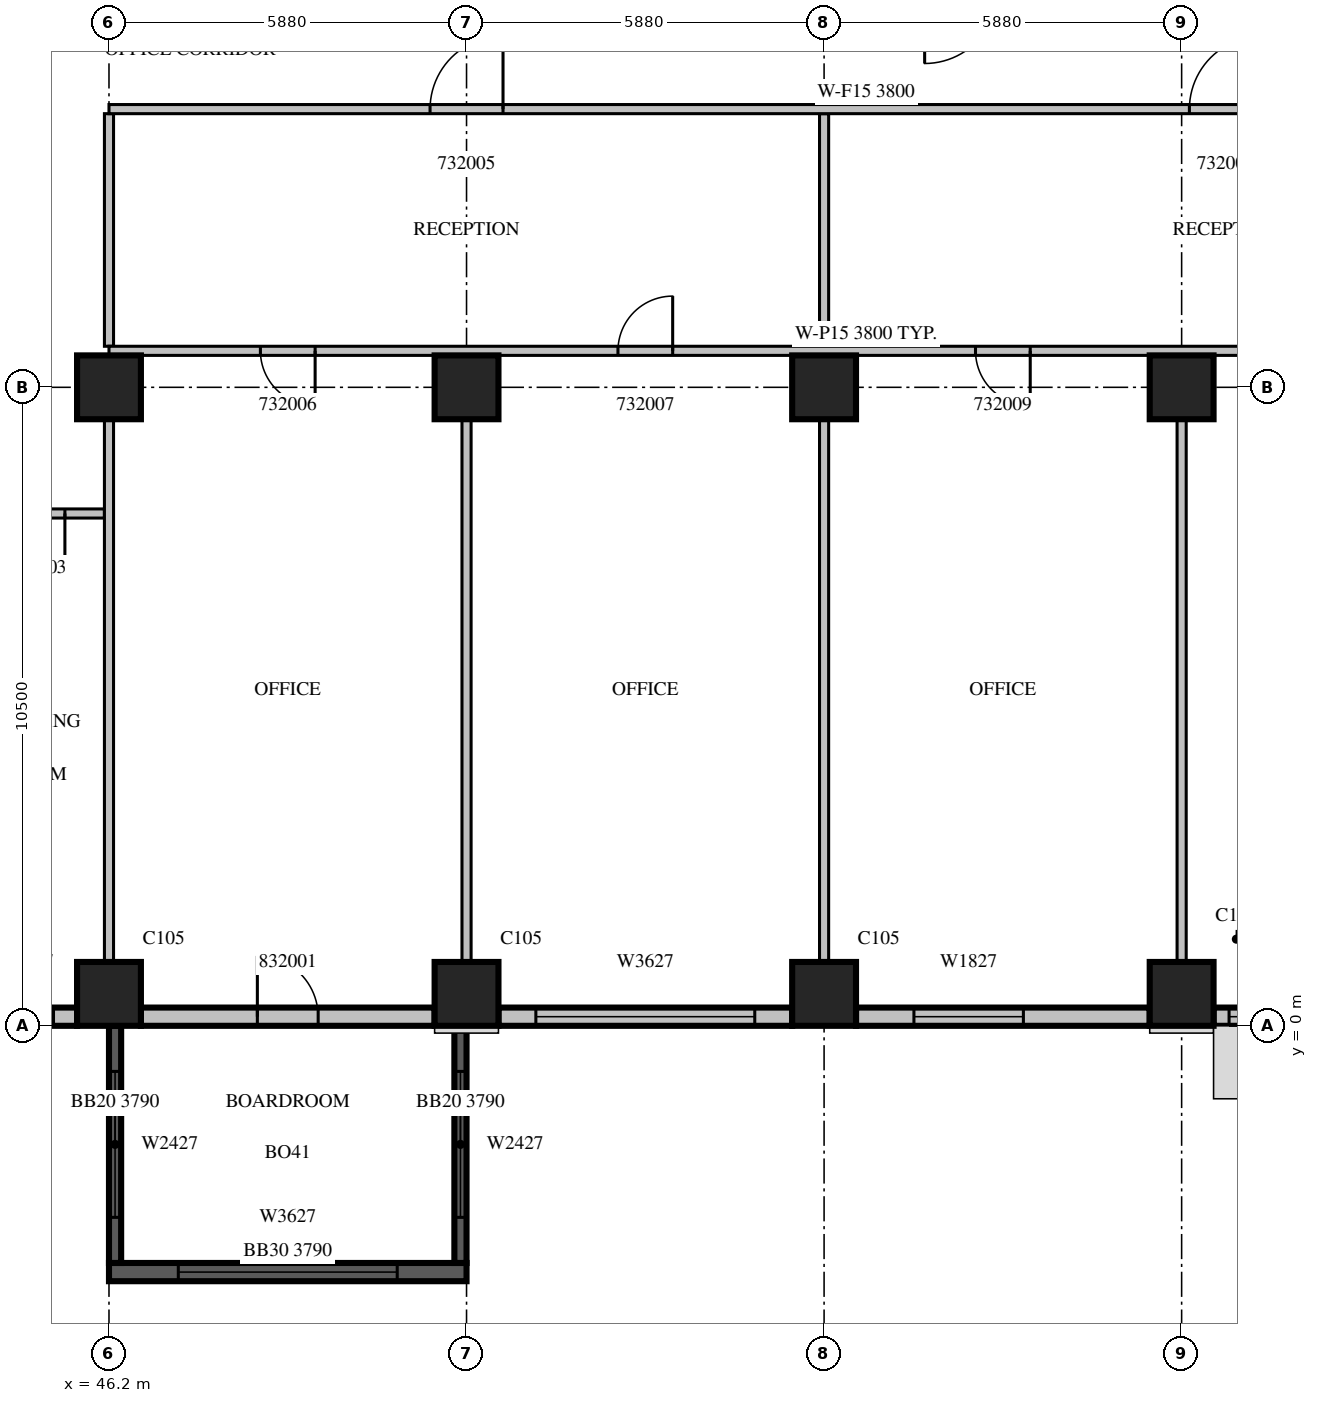
"""IFC4 building model, lengths in metres.
Left out: names, types, materials, properties, quantities, classifications, styles, units other than length and angle.
Written with IfcOpenShell. Run it as: python <this file> out.ifc"""

import sys

from ifc_helpers import new_model, si_unit, direction, frame, frame_2d, origin, origin_2d, place, context, subcontext, project, spatial, rectangle, extrude, source, transform, mapped, element, fill, save


model = new_model("IFC4")
c1 = context("Model", 3, precision=1e-05, world=origin(), true_north=direction((0.0, 1.0)))
c2 = subcontext(c1, "Body", "Model", "MODEL_VIEW")
j1 = project(units=[si_unit("LENGTHUNIT", "METRE"), si_unit("PLANEANGLEUNIT", "RADIAN")], contexts=[c1])
p1 = place(None, origin())
s1 = spatial("IfcSite", under=j1, at=p1, CompositionType="ELEMENT")
p2 = place(p1, origin())
s2 = spatial("IfcBuilding", under=s1, at=p2, CompositionType="ELEMENT")
p3 = place(p2, frame((0.0, 0.0, 145.5)))
s3 = spatial("IfcBuildingStorey", under=s2, at=p3, CompositionType="ELEMENT", Elevation=145.5)
m1 = source(origin(), c2, "Body", "SweptSolid", [
    extrude(rectangle(XDim=1.05, YDim=1.05, at=origin_2d()), origin(), (0.0, 0.0, 1.0), 4.2),
])
for number, where, z_axis, x_axis in (
    (1, (46.2, 0.525, 0.0), (0.0, 0.0, 1.0), (1.0, 0.0, 0.0)),
    (2, (52.08, 0.525, 0.0), (0.0, 0.0, 1.0), (1.0, 0.0, 0.0)),
    (3, (57.96, 0.525, 0.0), (0.0, 0.0, 1.0), (1.0, 0.0, 0.0)),
    (4, (63.84, 0.525, 0.0), (0.0, 0.0, 1.0), (1.0, 0.0, 0.0)),
    (5, (46.2, 10.5, 0.0), (0.0, 0.0, 1.0), (1.0, 0.0, 0.0)),
    (6, (52.08, 10.5, 0.0), (0.0, 0.0, 1.0), (1.0, 0.0, 0.0)),
    (7, (57.96, 10.5, 0.0), (0.0, 0.0, 1.0), (1.0, 0.0, 0.0)),
    (8, (63.84, 10.5, 0.0), (0.0, 0.0, 1.0), (1.0, 0.0, 0.0)),
):
    element("IfcColumn", number, at=place(p3, frame(where, z_axis=z_axis, x_axis=x_axis)), inside=s3, PredefinedType="COLUMN", context=c2, shape_type="MappedRepresentation", body=[
        mapped(m1, transform((0.0, 0.0, 0.0), scale=1.0)),
    ])
m2 = source(origin(), c2, "Body", "SweptSolid", [
    extrude(rectangle(XDim=1.675, YDim=0.3, at=frame_2d((0.838, 0.0))), origin(), (0.0, 0.0, 1.0), 3.8),
])
p4 = place(p3, frame((44.0, 0.15, 0.0), z_axis=(0.0, 0.0, 1.0), x_axis=(1.0, 0.0, 0.0)))
e9 = element("IfcWall", 9, at=p4, inside=s3, PredefinedType="STANDARD", context=c2, shape_type="MappedRepresentation", body=[
    mapped(m2, transform((0.0, 0.0, 0.0), scale=1.0)),
])
m3 = source(origin(), c2, "Body", "SweptSolid", [
    extrude(rectangle(XDim=0.9, YDim=2.7, at=frame_2d((0.45, 1.35))), frame((0.0, 0.16, 0.0), z_axis=(0.0, -1.0, 0.0), x_axis=(1.0, 0.0, 0.0)), (0.0, 0.0, 1.0), 0.32),
])
p5 = place(p4, frame((0.388, 0.0, 0.6)))
e10 = element("IfcOpeningElement", 10, at=p5, cuts=e9, PredefinedType="OPENING", context=c2, shape_type="MappedRepresentation", body=[
    mapped(m3, transform((0.0, 0.0, 0.0), scale=1.0)),
])
m4 = source(origin(), c2, "Body", "SweptSolid", [
    extrude(rectangle(XDim=4.83, YDim=0.3, at=frame_2d((2.415, 0.0))), origin(), (0.0, 0.0, 1.0), 3.8),
])
p6 = place(p3, frame((46.725, 0.15, 0.0), z_axis=(0.0, 0.0, 1.0), x_axis=(1.0, 0.0, 0.0)))
e11 = element("IfcWall", 11, at=p6, inside=s3, PredefinedType="STANDARD", context=c2, shape_type="MappedRepresentation", body=[
    mapped(m4, transform((0.0, 0.0, 0.0), scale=1.0)),
])
m5 = source(origin(), c2, "Body", "SweptSolid", [
    extrude(rectangle(XDim=1.0, YDim=2.1, at=frame_2d((0.5, 1.05))), frame((0.0, 0.16, 0.0), z_axis=(0.0, -1.0, 0.0), x_axis=(1.0, 0.0, 0.0)), (0.0, 0.0, 1.0), 0.32),
])
p7 = place(p6, frame((1.915, 0.0, 0.0)))
e12 = element("IfcOpeningElement", 12, at=p7, cuts=e11, PredefinedType="OPENING", context=c2, shape_type="MappedRepresentation", body=[
    mapped(m5, transform((0.0, 0.0, 0.0), scale=1.0)),
])
p8 = place(p3, frame((52.605, 0.15, 0.0), z_axis=(0.0, 0.0, 1.0), x_axis=(1.0, 0.0, 0.0)))
e13 = element("IfcWall", 13, at=p8, inside=s3, PredefinedType="STANDARD", context=c2, shape_type="MappedRepresentation", body=[
    mapped(m4, transform((0.0, 0.0, 0.0), scale=1.0)),
])
m6 = source(origin(), c2, "Body", "SweptSolid", [
    extrude(rectangle(XDim=3.6, YDim=2.7, at=frame_2d((1.8, 1.35))), frame((0.0, 0.16, 0.0), z_axis=(0.0, -1.0, 0.0), x_axis=(1.0, 0.0, 0.0)), (0.0, 0.0, 1.0), 0.32),
])
p9 = place(p8, frame((0.615, 0.0, 0.6)))
e14 = element("IfcOpeningElement", 14, at=p9, cuts=e13, PredefinedType="OPENING", context=c2, shape_type="MappedRepresentation", body=[
    mapped(m6, transform((0.0, 0.0, 0.0), scale=1.0)),
])
p10 = place(p3, frame((58.485, 0.15, 0.0), z_axis=(0.0, 0.0, 1.0), x_axis=(1.0, 0.0, 0.0)))
e15 = element("IfcWall", 15, at=p10, inside=s3, PredefinedType="STANDARD", context=c2, shape_type="MappedRepresentation", body=[
    mapped(m4, transform((0.0, 0.0, 0.0), scale=1.0)),
])
m7 = source(origin(), c2, "Body", "SweptSolid", [
    extrude(rectangle(XDim=1.8, YDim=2.7, at=frame_2d((0.9, 1.35))), frame((0.0, 0.16, 0.0), z_axis=(0.0, -1.0, 0.0), x_axis=(1.0, 0.0, 0.0)), (0.0, 0.0, 1.0), 0.32),
])
p11 = place(p10, frame((0.953, 0.0, 0.6)))
e16 = element("IfcOpeningElement", 16, at=p11, cuts=e15, PredefinedType="OPENING", context=c2, shape_type="MappedRepresentation", body=[
    mapped(m7, transform((0.0, 0.0, 0.0), scale=1.0)),
])
m8 = source(origin(), c2, "Body", "SweptSolid", [
    extrude(rectangle(XDim=2.835, YDim=0.3, at=frame_2d((1.417, 0.0))), origin(), (0.0, 0.0, 1.0), 3.8),
])
p12 = place(p3, frame((64.365, 0.15, 0.0), z_axis=(0.0, 0.0, 1.0), x_axis=(1.0, 0.0, 0.0)))
e17 = element("IfcWall", 17, at=p12, inside=s3, PredefinedType="STANDARD", context=c2, shape_type="MappedRepresentation", body=[
    mapped(m8, transform((0.0, 0.0, 0.0), scale=1.0)),
])
p13 = place(p12, frame((0.255, 0.0, 0.6)))
e18 = element("IfcOpeningElement", 18, at=p13, cuts=e17, PredefinedType="OPENING", context=c2, shape_type="MappedRepresentation", body=[
    mapped(m7, transform((0.0, 0.0, 0.0), scale=1.0)),
])
m9 = source(origin(), c2, "Body", "SweptSolid", [
    extrude(rectangle(XDim=5.88, YDim=0.3, at=frame_2d((2.94, 0.0))), origin(), (0.0, 0.0, 1.0), 3.79),
])
p14 = place(p3, frame((46.2, -4.05, 0.0), z_axis=(0.0, 0.0, 1.0), x_axis=(1.0, 0.0, 0.0)))
e19 = element("IfcWall", 19, at=p14, inside=s3, PredefinedType="SOLIDWALL", context=c2, shape_type="MappedRepresentation", body=[
    mapped(m9, transform((0.0, 0.0, 0.0), scale=1.0)),
])
p15 = place(p14, frame((1.14, 0.0, 0.6)))
e20 = element("IfcOpeningElement", 20, at=p15, cuts=e19, PredefinedType="OPENING", context=c2, shape_type="MappedRepresentation", body=[
    mapped(m6, transform((0.0, 0.0, 0.0), scale=1.0)),
])
m10 = source(origin(), c2, "Body", "SweptSolid", [
    extrude(rectangle(XDim=3.9, YDim=0.2, at=frame_2d((1.95, 0.0))), origin(), (0.0, 0.0, 1.0), 3.79),
])
p16 = place(p3, frame((46.3, 0.0, 0.0), z_axis=(0.0, 0.0, 1.0), x_axis=(0.0, -1.0, 0.0)))
e21 = element("IfcWall", 21, at=p16, inside=s3, PredefinedType="SOLIDWALL", context=c2, shape_type="MappedRepresentation", body=[
    mapped(m10, transform((0.0, 0.0, 0.0), scale=1.0)),
])
m11 = source(origin(), c2, "Body", "SweptSolid", [
    extrude(rectangle(XDim=2.4, YDim=2.7, at=frame_2d((1.2, 1.35))), frame((0.0, 0.11, 0.0), z_axis=(0.0, -1.0, 0.0), x_axis=(1.0, 0.0, 0.0)), (0.0, 0.0, 1.0), 0.22),
])
p17 = place(p16, frame((0.75, 0.0, 0.6)))
e22 = element("IfcOpeningElement", 22, at=p17, cuts=e21, PredefinedType="OPENING", context=c2, shape_type="MappedRepresentation", body=[
    mapped(m11, transform((0.0, 0.0, 0.0), scale=1.0)),
])
p18 = place(p3, frame((51.98, 0.0, 0.0), z_axis=(0.0, 0.0, 1.0), x_axis=(0.0, -1.0, 0.0)))
e23 = element("IfcWall", 23, at=p18, inside=s3, PredefinedType="SOLIDWALL", context=c2, shape_type="MappedRepresentation", body=[
    mapped(m10, transform((0.0, 0.0, 0.0), scale=1.0)),
])
p19 = place(p18, frame((0.75, 0.0, 0.6)))
e24 = element("IfcOpeningElement", 24, at=p19, cuts=e23, PredefinedType="OPENING", context=c2, shape_type="MappedRepresentation", body=[
    mapped(m11, transform((0.0, 0.0, 0.0), scale=1.0)),
])
m12 = source(origin(), c2, "Body", "SweptSolid", [
    extrude(rectangle(XDim=2.2, YDim=0.15, at=frame_2d((1.1, 0.0))), origin(), (0.0, 0.0, 1.0), 3.8),
])
p20 = place(p3, frame((46.125, 8.425, 0.0), z_axis=(0.0, 0.0, 1.0), x_axis=(-1.0, 0.0, 0.0)))
e25 = element("IfcWall", 25, at=p20, inside=s3, PredefinedType="PARTITIONING", context=c2, shape_type="MappedRepresentation", body=[
    mapped(m12, transform((0.0, 0.0, 0.0), scale=1.0)),
])
m13 = source(origin(), c2, "Body", "SweptSolid", [
    extrude(rectangle(XDim=0.9, YDim=2.1, at=frame_2d((0.45, 1.05))), frame((0.0, 0.085, 0.0), z_axis=(0.0, -1.0, 0.0), x_axis=(1.0, 0.0, 0.0)), (0.0, 0.0, 1.0), 0.17),
])
p21 = place(p20, frame((0.65, 0.0, 0.0)))
e26 = element("IfcOpeningElement", 26, at=p21, cuts=e25, PredefinedType="OPENING", context=c2, shape_type="MappedRepresentation", body=[
    mapped(m13, transform((0.0, 0.0, 0.0), scale=1.0)),
])
m14 = source(origin(), c2, "Body", "SweptSolid", [
    extrude(rectangle(XDim=8.927, YDim=0.15, at=frame_2d((4.463, 0.0))), origin(), (0.0, 0.0, 1.0), 3.8),
])
for number, where, z_axis, x_axis in (
    (27, (52.08, 1.049, 0.0), (0.0, 0.0, 1.0), (0.0, 1.0, 0.0)),
    (28, (63.84, 1.049, 0.0), (0.0, 0.0, 1.0), (0.0, 1.0, 0.0)),
    (29, (46.2, 1.049, 0.0), (0.0, 0.0, 1.0), (0.0, 1.0, 0.0)),
):
    element("IfcWall", number, at=place(p3, frame(where, z_axis=z_axis, x_axis=x_axis)), inside=s3, PredefinedType="PARTITIONING", context=c2, shape_type="MappedRepresentation", body=[
        mapped(m14, transform((0.0, 0.0, 0.0), scale=1.0)),
    ])
m15 = source(origin(), c2, "Body", "SweptSolid", [
    extrude(rectangle(XDim=3.825, YDim=0.15, at=frame_2d((1.913, 0.0))), origin(), (0.0, 0.0, 1.0), 3.8),
])
p22 = place(p3, frame((46.2, 11.175, 0.0), z_axis=(0.0, 0.0, 1.0), x_axis=(0.0, 1.0, 0.0)))
e30 = element("IfcWall", 30, at=p22, inside=s3, PredefinedType="PARTITIONING", context=c2, shape_type="MappedRepresentation", body=[
    mapped(m15, transform((0.0, 0.0, 0.0), scale=1.0)),
])
p23 = place(p3, frame((57.96, 1.049, 0.0), z_axis=(0.0, 0.0, 1.0), x_axis=(0.0, 1.0, 0.0)))
e31 = element("IfcWall", 31, at=p23, inside=s3, PredefinedType="PARTITIONING", context=c2, shape_type="MappedRepresentation", body=[
    mapped(m14, transform((0.0, 0.0, 0.0), scale=1.0)),
])
p24 = place(p3, frame((57.96, 11.175, 0.0), z_axis=(0.0, 0.0, 1.0), x_axis=(0.0, 1.0, 0.0)))
e32 = element("IfcWall", 32, at=p24, inside=s3, PredefinedType="PARTITIONING", context=c2, shape_type="MappedRepresentation", body=[
    mapped(m15, transform((0.0, 0.0, 0.0), scale=1.0)),
])
m16 = source(origin(), c2, "Body", "SweptSolid", [
    extrude(rectangle(XDim=24.9, YDim=0.15, at=frame_2d((12.45, 0.0))), origin(), (0.0, 0.0, 1.0), 3.8),
])
p25 = place(p3, frame((71.1, 11.1, 0.0), z_axis=(0.0, 0.0, 1.0), x_axis=(-1.0, 0.0, 0.0)))
e33 = element("IfcWall", 33, at=p25, inside=s3, PredefinedType="PARTITIONING", context=c2, shape_type="MappedRepresentation", body=[
    mapped(m16, transform((0.0, 0.0, 0.0), scale=1.0)),
])
p26 = place(p25, frame((21.51, 0.0, 0.0)))
e34 = element("IfcOpeningElement", 34, at=p26, cuts=e33, PredefinedType="OPENING", context=c2, shape_type="MappedRepresentation", body=[
    mapped(m13, transform((0.0, 0.0, 0.0), scale=1.0)),
])
p27 = place(p25, frame((15.63, 0.0, 0.0)))
e35 = element("IfcOpeningElement", 35, at=p27, cuts=e33, PredefinedType="OPENING", context=c2, shape_type="MappedRepresentation", body=[
    mapped(m13, transform((0.0, 0.0, 0.0), scale=1.0)),
])
p28 = place(p25, frame((9.75, 0.0, 0.0)))
e36 = element("IfcOpeningElement", 36, at=p28, cuts=e33, PredefinedType="OPENING", context=c2, shape_type="MappedRepresentation", body=[
    mapped(m13, transform((0.0, 0.0, 0.0), scale=1.0)),
])
p29 = place(p25, frame((4.645, 0.0, 0.0)))
e37 = element("IfcOpeningElement", 37, at=p29, cuts=e33, PredefinedType="OPENING", context=c2, shape_type="MappedRepresentation", body=[
    mapped(m13, transform((0.0, 0.0, 0.0), scale=1.0)),
])
p30 = place(p25, frame((2.205, 0.0, 0.0)))
e38 = element("IfcOpeningElement", 38, at=p30, cuts=e33, PredefinedType="OPENING", context=c2, shape_type="MappedRepresentation", body=[
    mapped(m13, transform((0.0, 0.0, 0.0), scale=1.0)),
])
p31 = place(p3, frame((71.1, 15.075, 0.0), z_axis=(0.0, 0.0, 1.0), x_axis=(-1.0, 0.0, 0.0)))
e39 = element("IfcWall", 39, at=p31, inside=s3, PredefinedType="PARTITIONING", context=c2, shape_type="MappedRepresentation", body=[
    mapped(m16, transform((0.0, 0.0, 0.0), scale=1.0)),
])
m17 = source(origin(), c2, "Body", "SweptSolid", [
    extrude(rectangle(XDim=1.2, YDim=2.1, at=frame_2d((0.6, 1.05))), frame((0.0, 0.085, 0.0), z_axis=(0.0, -1.0, 0.0), x_axis=(1.0, 0.0, 0.0)), (0.0, 0.0, 1.0), 0.17),
])
p32 = place(p31, frame((18.42, 0.0, 0.0)))
e40 = element("IfcOpeningElement", 40, at=p32, cuts=e39, PredefinedType="OPENING", context=c2, shape_type="MappedRepresentation", body=[
    mapped(m17, transform((0.0, 0.0, 0.0), scale=1.0)),
])
p33 = place(p31, frame((5.933, 0.0, 0.0)))
e41 = element("IfcOpeningElement", 41, at=p33, cuts=e39, PredefinedType="OPENING", context=c2, shape_type="MappedRepresentation", body=[
    mapped(m17, transform((0.0, 0.0, 0.0), scale=1.0)),
])
m18 = source(origin(), c2, "Body", "SweptSolid", [
    extrude(rectangle(XDim=0.9, YDim=2.7, at=frame_2d((0.45, 1.35))), frame((0.0, 0.03, 0.0), z_axis=(0.0, -1.0, 0.0), x_axis=(1.0, 0.0, 0.0)), (0.0, 0.0, 1.0), 0.06),
])
p34 = place(p5, origin())
e42 = element("IfcWindow", 42, at=p34, inside=s3, PartitioningType="SINGLE_PANEL", PredefinedType="WINDOW", context=c2, shape_type="MappedRepresentation", body=[
    mapped(m18, transform((0.0, 0.0, 0.0), scale=1.0)),
])
fill(e10, e42)
m19 = source(origin(), c2, "Body", "SweptSolid", [
    extrude(rectangle(XDim=3.6, YDim=2.7, at=frame_2d((1.8, 1.35))), frame((0.0, 0.03, 0.0), z_axis=(0.0, -1.0, 0.0), x_axis=(1.0, 0.0, 0.0)), (0.0, 0.0, 1.0), 0.06),
])
p35 = place(p9, origin())
e43 = element("IfcWindow", 43, at=p35, inside=s3, PartitioningType="SINGLE_PANEL", PredefinedType="WINDOW", context=c2, shape_type="MappedRepresentation", body=[
    mapped(m19, transform((0.0, 0.0, 0.0), scale=1.0)),
])
fill(e14, e43)
m20 = source(origin(), c2, "Body", "SweptSolid", [
    extrude(rectangle(XDim=1.8, YDim=2.7, at=frame_2d((0.9, 1.35))), frame((0.0, 0.03, 0.0), z_axis=(0.0, -1.0, 0.0), x_axis=(1.0, 0.0, 0.0)), (0.0, 0.0, 1.0), 0.06),
])
p36 = place(p11, origin())
e44 = element("IfcWindow", 44, at=p36, inside=s3, PartitioningType="SINGLE_PANEL", PredefinedType="WINDOW", context=c2, shape_type="MappedRepresentation", body=[
    mapped(m20, transform((0.0, 0.0, 0.0), scale=1.0)),
])
fill(e16, e44)
p37 = place(p13, origin())
e45 = element("IfcWindow", 45, at=p37, inside=s3, PartitioningType="SINGLE_PANEL", PredefinedType="WINDOW", context=c2, shape_type="MappedRepresentation", body=[
    mapped(m20, transform((0.0, 0.0, 0.0), scale=1.0)),
])
fill(e18, e45)
p38 = place(p15, origin())
e46 = element("IfcWindow", 46, at=p38, inside=s3, PartitioningType="SINGLE_PANEL", PredefinedType="WINDOW", context=c2, shape_type="MappedRepresentation", body=[
    mapped(m19, transform((0.0, 0.0, 0.0), scale=1.0)),
])
fill(e20, e46)
m21 = source(origin(), c2, "Body", "SweptSolid", [
    extrude(rectangle(XDim=2.4, YDim=2.7, at=frame_2d((1.2, 1.35))), frame((0.0, 0.03, 0.0), z_axis=(0.0, -1.0, 0.0), x_axis=(1.0, 0.0, 0.0)), (0.0, 0.0, 1.0), 0.06),
])
p39 = place(p17, origin())
e47 = element("IfcWindow", 47, at=p39, inside=s3, PartitioningType="SINGLE_PANEL", PredefinedType="WINDOW", context=c2, shape_type="MappedRepresentation", body=[
    mapped(m21, transform((0.0, 0.0, 0.0), scale=1.0)),
])
fill(e22, e47)
p40 = place(p19, origin())
e48 = element("IfcWindow", 48, at=p40, inside=s3, PartitioningType="SINGLE_PANEL", PredefinedType="WINDOW", context=c2, shape_type="MappedRepresentation", body=[
    mapped(m21, transform((0.0, 0.0, 0.0), scale=1.0)),
])
fill(e24, e48)
m22 = source(origin(), c2, "Body", "SweptSolid", [
    extrude(rectangle(XDim=0.9, YDim=2.1, at=frame_2d((0.45, 1.05))), frame((0.0, 0.025, 0.0), z_axis=(0.0, -1.0, 0.0), x_axis=(1.0, 0.0, 0.0)), (0.0, 0.0, 1.0), 0.05),
])
p41 = place(p21, origin())
e49 = element("IfcDoor", 49, at=p41, inside=s3, OperationType="SINGLE_SWING_LEFT", PredefinedType="DOOR", context=c2, shape_type="MappedRepresentation", body=[
    mapped(m22, transform((0.0, 0.0, 0.0), scale=1.0)),
])
fill(e26, e49)
m23 = source(origin(), c2, "Body", "SweptSolid", [
    extrude(rectangle(XDim=1.2, YDim=2.1, at=frame_2d((0.6, 1.05))), frame((0.0, 0.025, 0.0), z_axis=(0.0, -1.0, 0.0), x_axis=(1.0, 0.0, 0.0)), (0.0, 0.0, 1.0), 0.05),
])
p42 = place(p32, origin())
e50 = element("IfcDoor", 50, at=p42, inside=s3, OperationType="SINGLE_SWING_RIGHT", PredefinedType="DOOR", context=c2, shape_type="MappedRepresentation", body=[
    mapped(m23, transform((0.0, 0.0, 0.0), scale=1.0)),
])
fill(e40, e50)
p43 = place(p26, origin())
e51 = element("IfcDoor", 51, at=p43, inside=s3, OperationType="SINGLE_SWING_LEFT", PredefinedType="DOOR", context=c2, shape_type="MappedRepresentation", body=[
    mapped(m22, transform((0.0, 0.0, 0.0), scale=1.0)),
])
fill(e34, e51)
p44 = place(p27, origin())
e52 = element("IfcDoor", 52, at=p44, inside=s3, OperationType="SINGLE_SWING_RIGHT", PredefinedType="DOOR", context=c2, shape_type="MappedRepresentation", body=[
    mapped(m22, transform((0.0, 0.0, 0.0), scale=1.0)),
])
fill(e35, e52)
p45 = place(p33, origin())
e53 = element("IfcDoor", 53, at=p45, inside=s3, OperationType="SINGLE_SWING_RIGHT", PredefinedType="DOOR", context=c2, shape_type="MappedRepresentation", body=[
    mapped(m23, transform((0.0, 0.0, 0.0), scale=1.0)),
])
fill(e41, e53)
p46 = place(p28, origin())
e54 = element("IfcDoor", 54, at=p46, inside=s3, OperationType="SINGLE_SWING_LEFT", PredefinedType="DOOR", context=c2, shape_type="MappedRepresentation", body=[
    mapped(m22, transform((0.0, 0.0, 0.0), scale=1.0)),
])
fill(e36, e54)
m24 = source(origin(), c2, "Body", "SweptSolid", [
    extrude(rectangle(XDim=1.0, YDim=2.1, at=frame_2d((0.5, 1.05))), frame((0.0, 0.025, 0.0), z_axis=(0.0, -1.0, 0.0), x_axis=(1.0, 0.0, 0.0)), (0.0, 0.0, 1.0), 0.05),
])
p47 = place(p7, origin())
e55 = element("IfcDoor", 55, at=p47, inside=s3, OperationType="SINGLE_SWING_LEFT", PredefinedType="DOOR", context=c2, shape_type="MappedRepresentation", body=[
    mapped(m24, transform((0.0, 0.0, 0.0), scale=1.0)),
])
fill(e12, e55)
save(model, sys.argv[1])
